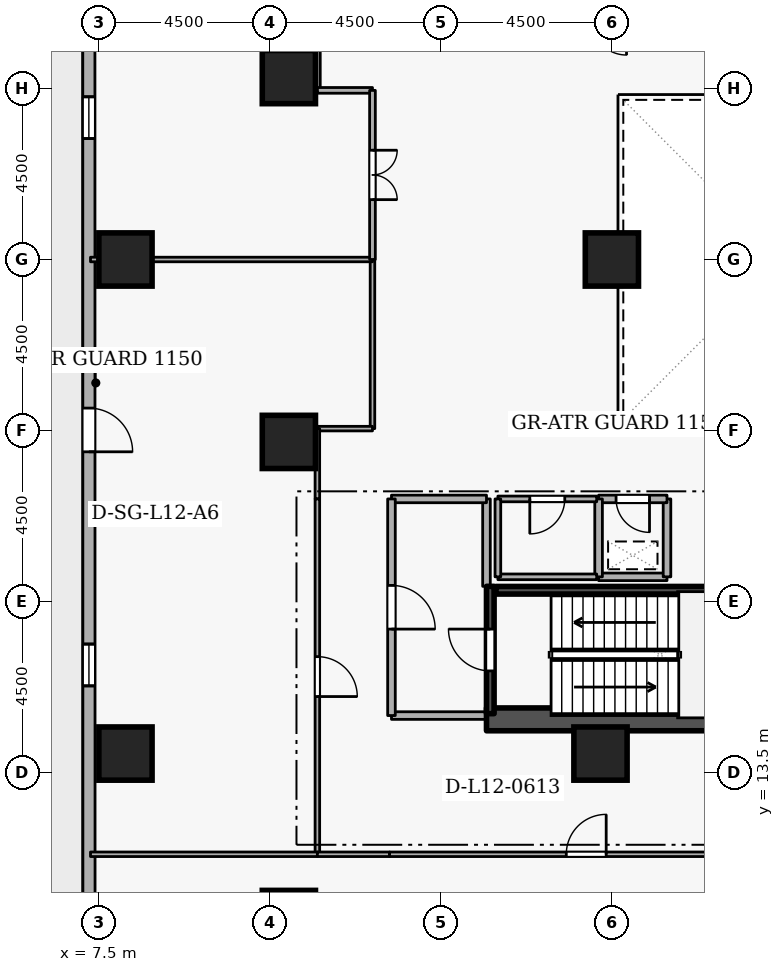
"""IFC4 building model, lengths in metres.
Left out: names, types, materials, properties, quantities, classifications, styles, units other than length and angle.
Written with IfcOpenShell. Run it as: python <this file> out.ifc"""

import sys

from ifc_helpers import new_model, si_unit, direction, frame, frame_2d, origin, origin_2d, place, context, subcontext, project, spatial, rectangle, extrude, element, fill, save


model = new_model("IFC4")
c1 = context("Model", 3, precision=1e-05, world=origin(), true_north=direction((0.0, 1.0)))
c2 = subcontext(c1, "Body", "Model", "MODEL_VIEW")
j1 = project(units=[si_unit("LENGTHUNIT", "METRE"), si_unit("PLANEANGLEUNIT", "RADIAN")], contexts=[c1])
p1 = place(None, origin())
s1 = spatial("IfcSite", under=j1, at=p1, CompositionType="ELEMENT")
p2 = place(p1, origin())
s2 = spatial("IfcBuilding", under=s1, at=p2, CompositionType="ELEMENT")
p3 = place(p2, frame((0.0, 0.0, 49.5)))
s3 = spatial("IfcBuildingStorey", under=s2, at=p3, CompositionType="ELEMENT", Elevation=49.5)
p4 = place(p3, frame((17.7, 14.9, 0.0), z_axis=(0.0, 0.0, 1.0), x_axis=(1.0, 0.0, 0.0)))
e1 = element("IfcWall", 1, at=p4, inside=s3, PredefinedType="SHEAR", context=c2, shape_type="SweptSolid", body=[
    extrude(rectangle(XDim=15.6, YDim=0.6, at=frame_2d((7.8, 0.0))), origin(), (0.0, 0.0, 1.0), 4.2),
])
for number, where, z_axis, x_axis in (
    (2, (12.5, 9.7, 0.0), (0.0, 0.0, 1.0), (1.0, 0.0, 0.0)),
    (3, (8.2, 14.0, 0.0), (0.0, 0.0, 1.0), (1.0, 0.0, 0.0)),
    (4, (8.2, 27.0, 0.0), (0.0, 0.0, 1.0), (1.0, 0.0, 0.0)),
    (5, (12.5, 22.2, 0.0), (0.0, 0.0, 1.0), (1.0, 0.0, 0.0)),
    (6, (12.5, 31.8, 0.0), (0.0, 0.0, 1.0), (1.0, 0.0, 0.0)),
    (7, (20.7, 14.0, 0.0), (0.0, 0.0, 1.0), (1.0, 0.0, 0.0)),
    (8, (21.0, 27.0, 0.0), (0.0, 0.0, 1.0), (1.0, 0.0, 0.0)),
):
    element("IfcColumn", number, at=place(p3, frame(where, z_axis=z_axis, x_axis=x_axis)), inside=s3, PredefinedType="COLUMN", context=c2, shape_type="SweptSolid", body=[
        extrude(rectangle(XDim=1.4, YDim=1.4, at=origin_2d()), origin(), (0.0, 0.0, 1.0), 4.2),
    ])
p5 = place(p3, frame((7.235, 42.681, 0.0), z_axis=(0.0, 0.0, 1.0), x_axis=(0.000150313265, -0.999999988703, 0.0)))
e9 = element("IfcWall", 9, at=p5, inside=s3, PredefinedType="STANDARD", context=c2, shape_type="SweptSolid", body=[
    extrude(rectangle(XDim=35.733, YDim=0.32, at=frame_2d((17.866, 0.0))), origin(), (0.0, 0.0, 1.0), 3.3),
])
p6 = place(p5, frame((19.591, 0.0, 0.0)))
e10 = element("IfcOpeningElement", 10, at=p6, cuts=e9, PredefinedType="OPENING", context=c2, shape_type="SweptSolid", body=[
    extrude(rectangle(XDim=1.15, YDim=2.1, at=frame_2d((0.575, 1.05))), frame((0.0, 0.17, 0.0), z_axis=(0.0, -1.0, 0.0), x_axis=(1.0, 0.0, 0.0)), (0.0, 0.0, 1.0), 0.34),
])
p7 = place(p5, frame((6.6, 0.0, 0.72)))
e11 = element("IfcOpeningElement", 11, at=p7, cuts=e9, PredefinedType="OPENING", context=c2, shape_type="SweptSolid", body=[
    extrude(rectangle(XDim=1.1, YDim=1.8, at=frame_2d((0.55, 0.9))), frame((0.0, 0.17, 0.0), z_axis=(0.0, -1.0, 0.0), x_axis=(1.0, 0.0, 0.0)), (0.0, 0.0, 1.0), 0.34),
])
p8 = place(p5, frame((11.4, 0.0, 0.72)))
e12 = element("IfcOpeningElement", 12, at=p8, cuts=e9, PredefinedType="OPENING", context=c2, shape_type="SweptSolid", body=[
    extrude(rectangle(XDim=1.1, YDim=1.8, at=frame_2d((0.55, 0.9))), frame((0.0, 0.17, 0.0), z_axis=(0.0, -1.0, 0.0), x_axis=(1.0, 0.0, 0.0)), (0.0, 0.0, 1.0), 0.34),
])
p9 = place(p5, frame((25.8, 0.0, 0.72)))
e13 = element("IfcOpeningElement", 13, at=p9, cuts=e9, PredefinedType="OPENING", context=c2, shape_type="SweptSolid", body=[
    extrude(rectangle(XDim=1.1, YDim=1.8, at=frame_2d((0.55, 0.9))), frame((0.0, 0.17, 0.0), z_axis=(0.0, -1.0, 0.0), x_axis=(1.0, 0.0, 0.0)), (0.0, 0.0, 1.0), 0.34),
])
p10 = place(p3, frame((17.8, 15.05, 0.0), z_axis=(0.0, 0.0, 1.0), x_axis=(0.0, 1.0, 0.0)))
e14 = element("IfcWall", 14, at=p10, inside=s3, PredefinedType="SHEAR", context=c2, shape_type="SweptSolid", body=[
    extrude(rectangle(XDim=3.35, YDim=0.2, at=frame_2d((1.675, 0.0))), origin(), (0.0, 0.0, 1.0), 4.2),
])
p11 = place(p10, frame((1.125, 0.0, 0.0)))
e15 = element("IfcOpeningElement", 15, at=p11, cuts=e14, PredefinedType="OPENING", context=c2, shape_type="SweptSolid", body=[
    extrude(rectangle(XDim=1.1, YDim=2.1, at=frame_2d((0.55, 1.05))), frame((0.0, 0.11, 0.0), z_axis=(0.0, -1.0, 0.0), x_axis=(1.0, 0.0, 0.0)), (0.0, 0.0, 1.0), 0.22),
])
p12 = place(p3, frame((25.05, 18.297, 0.0), z_axis=(0.0, 0.0, 1.0), x_axis=(-1.0, 0.0, 0.0)))
e16 = element("IfcWall", 16, at=p12, inside=s3, PredefinedType="SHEAR", context=c2, shape_type="SweptSolid", body=[
    extrude(rectangle(XDim=7.1, YDim=0.2, at=frame_2d((3.55, 0.0))), origin(), (0.0, 0.0, 1.0), 4.2),
])
p13 = place(p3, frame((15.2, 15.0, 0.0), z_axis=(0.0, 0.0, 1.0), x_axis=(1.0, 0.0, 0.0)))
e17 = element("IfcWall", 17, at=p13, inside=s3, PredefinedType="STANDARD", context=c2, shape_type="SweptSolid", body=[
    extrude(rectangle(XDim=2.5, YDim=0.2, at=frame_2d((1.25, 0.0))), origin(), (0.0, 0.0, 1.0), 3.94),
])
p14 = place(p3, frame((17.7, 18.4, 0.0), z_axis=(0.0, 0.0, 1.0), x_axis=(0.0, 1.0, 0.0)))
e18 = element("IfcWall", 18, at=p14, inside=s3, PredefinedType="STANDARD", context=c2, shape_type="SweptSolid", body=[
    extrude(rectangle(XDim=2.3, YDim=0.2, at=frame_2d((1.15, 0.0))), origin(), (0.0, 0.0, 1.0), 3.145),
])
p15 = place(p3, frame((17.7, 20.7, 0.0), z_axis=(0.0, 0.0, 1.0), x_axis=(-1.0, 0.0, 0.0)))
e19 = element("IfcWall", 19, at=p15, inside=s3, PredefinedType="STANDARD", context=c2, shape_type="SweptSolid", body=[
    extrude(rectangle(XDim=2.5, YDim=0.2, at=frame_2d((1.25, 0.0))), origin(), (0.0, 0.0, 1.0), 3.94),
])
p16 = place(p3, frame((15.2, 20.7, 0.0), z_axis=(0.0, 0.0, 1.0), x_axis=(0.0, -1.0, 0.0)))
e20 = element("IfcWall", 20, at=p16, inside=s3, PredefinedType="STANDARD", context=c2, shape_type="SweptSolid", body=[
    extrude(rectangle(XDim=5.7, YDim=0.2, at=frame_2d((2.85, 0.0))), origin(), (0.0, 0.0, 1.0), 3.94),
])
p17 = place(p16, frame((2.275, 0.0, 0.0)))
e21 = element("IfcOpeningElement", 21, at=p17, cuts=e20, PredefinedType="OPENING", context=c2, shape_type="SweptSolid", body=[
    extrude(rectangle(XDim=1.15, YDim=2.1, at=frame_2d((0.575, 1.05))), frame((0.0, 0.11, 0.0), z_axis=(0.0, -1.0, 0.0), x_axis=(1.0, 0.0, 0.0)), (0.0, 0.0, 1.0), 0.22),
])
p18 = place(p3, frame((20.65, 18.65, 0.0), z_axis=(0.0, 0.0, 1.0), x_axis=(1.0, 0.0, 0.0)))
e22 = element("IfcWall", 22, at=p18, inside=s3, PredefinedType="STANDARD", context=c2, shape_type="SweptSolid", body=[
    extrude(rectangle(XDim=1.8, YDim=0.2, at=frame_2d((0.9, 0.0))), origin(), (0.0, 0.0, 1.0), 3.94),
])
p19 = place(p3, frame((22.45, 18.65, 0.0), z_axis=(0.0, 0.0, 1.0), x_axis=(0.0, 1.0, 0.0)))
e23 = element("IfcWall", 23, at=p19, inside=s3, PredefinedType="STANDARD", context=c2, shape_type="SweptSolid", body=[
    extrude(rectangle(XDim=2.05, YDim=0.2, at=frame_2d((1.025, 0.0))), origin(), (0.0, 0.0, 1.0), 3.94),
])
p20 = place(p3, frame((22.45, 20.7, 0.0), z_axis=(0.0, 0.0, 1.0), x_axis=(-1.0, 0.0, 0.0)))
e24 = element("IfcWall", 24, at=p20, inside=s3, PredefinedType="STANDARD", context=c2, shape_type="SweptSolid", body=[
    extrude(rectangle(XDim=1.8, YDim=0.2, at=frame_2d((0.9, 0.0))), origin(), (0.0, 0.0, 1.0), 3.94),
])
p21 = place(p20, frame((0.46, 0.0, 0.0)))
e25 = element("IfcOpeningElement", 25, at=p21, cuts=e24, PredefinedType="OPENING", context=c2, shape_type="SweptSolid", body=[
    extrude(rectangle(XDim=0.88, YDim=2.04, at=frame_2d((0.44, 1.02))), frame((0.0, 0.11, 0.0), z_axis=(0.0, -1.0, 0.0), x_axis=(1.0, 0.0, 0.0)), (0.0, 0.0, 1.0), 0.22),
])
p22 = place(p3, frame((20.65, 20.7, 0.0), z_axis=(0.0, 0.0, 1.0), x_axis=(0.0, -1.0, 0.0)))
e26 = element("IfcWall", 26, at=p22, inside=s3, PredefinedType="STANDARD", context=c2, shape_type="SweptSolid", body=[
    extrude(rectangle(XDim=2.05, YDim=0.2, at=frame_2d((1.025, 0.0))), origin(), (0.0, 0.0, 1.0), 3.94),
])
p23 = place(p3, frame((18.0, 18.65, 0.0), z_axis=(0.0, 0.0, 1.0), x_axis=(1.0, 0.0, 0.0)))
e27 = element("IfcWall", 27, at=p23, inside=s3, PredefinedType="PARTITIONING", context=c2, shape_type="SweptSolid", body=[
    extrude(rectangle(XDim=2.6, YDim=0.15, at=frame_2d((1.3, 0.0))), origin(), (0.0, 0.0, 1.0), 3.94),
])
p24 = place(p3, frame((20.6, 20.7, 0.0), z_axis=(0.0, 0.0, 1.0), x_axis=(-1.0, 0.0, 0.0)))
e28 = element("IfcWall", 28, at=p24, inside=s3, PredefinedType="PARTITIONING", context=c2, shape_type="SweptSolid", body=[
    extrude(rectangle(XDim=2.6, YDim=0.15, at=frame_2d((1.3, 0.0))), origin(), (0.0, 0.0, 1.0), 3.94),
])
p25 = place(p24, frame((0.84, 0.0, 0.0)))
e29 = element("IfcOpeningElement", 29, at=p25, cuts=e28, PredefinedType="OPENING", context=c2, shape_type="SweptSolid", body=[
    extrude(rectangle(XDim=0.92, YDim=2.08, at=frame_2d((0.46, 1.04))), frame((0.0, 0.085, 0.0), z_axis=(0.0, -1.0, 0.0), x_axis=(1.0, 0.0, 0.0)), (0.0, 0.0, 1.0), 0.17),
])
p26 = place(p3, frame((18.0, 20.7, 0.0), z_axis=(0.0, 0.0, 1.0), x_axis=(0.0, -1.0, 0.0)))
e30 = element("IfcWall", 30, at=p26, inside=s3, PredefinedType="PARTITIONING", context=c2, shape_type="SweptSolid", body=[
    extrude(rectangle(XDim=2.05, YDim=0.15, at=frame_2d((1.025, 0.0))), origin(), (0.0, 0.0, 1.0), 3.145),
])
p27 = place(p3, frame((14.7, 27.0, 0.0), z_axis=(0.0, 0.0, 1.0), x_axis=(0.0, -1.0, 0.0)))
e31 = element("IfcWall", 31, at=p27, inside=s3, PredefinedType="PARTITIONING", context=c2, shape_type="SweptSolid", body=[
    extrude(rectangle(XDim=4.45, YDim=0.12, at=frame_2d((2.225, 0.0))), origin(), (0.0, 0.0, 1.0), 3.94),
])
p28 = place(p3, frame((14.7, 22.55, 0.0), z_axis=(0.0, 0.0, 1.0), x_axis=(-1.0, 0.0, 0.0)))
e32 = element("IfcWall", 32, at=p28, inside=s3, PredefinedType="PARTITIONING", context=c2, shape_type="SweptSolid", body=[
    extrude(rectangle(XDim=1.45, YDim=0.12, at=frame_2d((0.725, 0.0))), origin(), (0.0, 0.0, 1.0), 3.94),
])
p29 = place(p3, frame((13.25, 22.55, 0.0), z_axis=(0.0, 0.0, 1.0), x_axis=(0.0, -1.0, 0.0)))
e33 = element("IfcWall", 33, at=p29, inside=s3, PredefinedType="PARTITIONING", context=c2, shape_type="SweptSolid", body=[
    extrude(rectangle(XDim=1.85, YDim=0.12, at=frame_2d((0.925, 0.0))), origin(), (0.0, 0.0, 1.0), 3.94),
])
p30 = place(p3, frame((13.25, 20.7, 0.0), z_axis=(0.0, 0.0, 1.0), x_axis=(0.0, -1.0, 0.0)))
e34 = element("IfcWall", 34, at=p30, inside=s3, PredefinedType="PARTITIONING", context=c2, shape_type="SweptSolid", body=[
    extrude(rectangle(XDim=9.35, YDim=0.12, at=frame_2d((4.675, 0.0))), origin(), (0.0, 0.0, 1.0), 3.94),
])
p31 = place(p30, frame((4.15, 0.0, 0.0)))
e35 = element("IfcOpeningElement", 35, at=p31, cuts=e34, PredefinedType="OPENING", context=c2, shape_type="SweptSolid", body=[
    extrude(rectangle(XDim=1.05, YDim=2.1, at=frame_2d((0.525, 1.05))), frame((0.0, 0.07, 0.0), z_axis=(0.0, -1.0, 0.0), x_axis=(1.0, 0.0, 0.0)), (0.0, 0.0, 1.0), 0.14),
])
p32 = place(p3, frame((13.25, 11.35, 0.0), z_axis=(0.0, 0.0, 1.0), x_axis=(-1.0, 0.0, 0.0)))
e36 = element("IfcWall", 36, at=p32, inside=s3, PredefinedType="PARTITIONING", context=c2, shape_type="SweptSolid", body=[
    extrude(rectangle(XDim=5.97, YDim=0.12, at=frame_2d((2.985, 0.0))), origin(), (0.0, 0.0, 1.0), 3.94),
])
p33 = place(p3, frame((7.28, 27.0, 0.0), z_axis=(0.0, 0.0, 1.0), x_axis=(1.0, 0.0, 0.0)))
e37 = element("IfcWall", 37, at=p33, inside=s3, PredefinedType="PARTITIONING", context=c2, shape_type="SweptSolid", body=[
    extrude(rectangle(XDim=7.42, YDim=0.12, at=frame_2d((3.71, 0.0))), origin(), (0.0, 0.0, 1.0), 3.532),
])
p34 = place(p3, frame((13.25, 33.3, 0.0), z_axis=(0.0, 0.0, 1.0), x_axis=(0.0, -1.0, 0.0)))
e38 = element("IfcWall", 38, at=p34, inside=s3, PredefinedType="PARTITIONING", context=c2, shape_type="SweptSolid", body=[
    extrude(rectangle(XDim=1.85, YDim=0.15, at=frame_2d((0.925, 0.0))), origin(), (0.0, 0.0, 1.0), 3.94),
])
p35 = place(p3, frame((13.25, 31.45, 0.0), z_axis=(0.0, 0.0, 1.0), x_axis=(1.0, 0.0, 0.0)))
e39 = element("IfcWall", 39, at=p35, inside=s3, PredefinedType="PARTITIONING", context=c2, shape_type="SweptSolid", body=[
    extrude(rectangle(XDim=1.45, YDim=0.15, at=frame_2d((0.725, 0.0))), origin(), (0.0, 0.0, 1.0), 3.94),
])
p36 = place(p3, frame((14.7, 31.45, 0.0), z_axis=(0.0, 0.0, 1.0), x_axis=(0.0, -1.0, 0.0)))
e40 = element("IfcWall", 40, at=p36, inside=s3, PredefinedType="PARTITIONING", context=c2, shape_type="SweptSolid", body=[
    extrude(rectangle(XDim=4.45, YDim=0.15, at=frame_2d((2.225, 0.0))), origin(), (0.0, 0.0, 1.0), 3.94),
])
p37 = place(p36, frame((1.575, 0.0, 0.0)))
e41 = element("IfcOpeningElement", 41, at=p37, cuts=e40, PredefinedType="OPENING", context=c2, shape_type="SweptSolid", body=[
    extrude(rectangle(XDim=1.3, YDim=2.12, at=frame_2d((0.65, 1.06))), frame((0.0, 0.085, 0.0), z_axis=(0.0, -1.0, 0.0), x_axis=(1.0, 0.0, 0.0)), (0.0, 0.0, 1.0), 0.17),
])
p38 = place(p3, frame((13.25, 11.35, 0.0), z_axis=(0.0, 0.0, 1.0), x_axis=(1.0, 0.0, 0.0)))
e42 = element("IfcWall", 42, at=p38, inside=s3, PredefinedType="PARTITIONING", context=c2, shape_type="SweptSolid", body=[
    extrude(rectangle(XDim=1.9, YDim=0.12, at=frame_2d((0.95, 0.0))), origin(), (0.0, 0.0, 1.0), 3.94),
])
p39 = place(p3, frame((15.15, 11.35, 0.0), z_axis=(0.0, 0.0, 1.0), x_axis=(1.0, 0.0, 0.0)))
e43 = element("IfcWall", 43, at=p39, inside=s3, PredefinedType="PARTITIONING", context=c2, shape_type="SweptSolid", body=[
    extrude(rectangle(XDim=10.35, YDim=0.12, at=frame_2d((5.175, 0.0))), origin(), (0.0, 0.0, 1.0), 3.94),
])
p40 = place(p39, frame((4.65, 0.0, 0.0)))
e44 = element("IfcOpeningElement", 44, at=p40, cuts=e43, PredefinedType="OPENING", context=c2, shape_type="SweptSolid", body=[
    extrude(rectangle(XDim=1.05, YDim=2.1, at=frame_2d((0.525, 1.05))), frame((0.0, 0.07, 0.0), z_axis=(0.0, -1.0, 0.0), x_axis=(1.0, 0.0, 0.0)), (0.0, 0.0, 1.0), 0.14),
])
p41 = place(p6, origin())
e45 = element("IfcDoor", 45, at=p41, inside=s3, OperationType="SINGLE_SWING_RIGHT", PredefinedType="DOOR", context=c2, shape_type="SweptSolid", body=[
    extrude(rectangle(XDim=1.15, YDim=2.1, at=frame_2d((0.575, 1.05))), frame((0.0, 0.025, 0.0), z_axis=(0.0, -1.0, 0.0), x_axis=(1.0, 0.0, 0.0)), (0.0, 0.0, 1.0), 0.05),
])
fill(e10, e45)
p42 = place(p8, origin())
e46 = element("IfcWindow", 46, at=p42, inside=s3, PartitioningType="SINGLE_PANEL", PredefinedType="WINDOW", context=c2, shape_type="SweptSolid", body=[
    extrude(rectangle(XDim=1.1, YDim=1.8, at=frame_2d((0.55, 0.9))), frame((0.0, 0.03, 0.0), z_axis=(0.0, -1.0, 0.0), x_axis=(1.0, 0.0, 0.0)), (0.0, 0.0, 1.0), 0.06),
])
fill(e12, e46)
p43 = place(p9, origin())
e47 = element("IfcWindow", 47, at=p43, inside=s3, PartitioningType="SINGLE_PANEL", PredefinedType="WINDOW", context=c2, shape_type="SweptSolid", body=[
    extrude(rectangle(XDim=1.1, YDim=1.8, at=frame_2d((0.55, 0.9))), frame((0.0, 0.03, 0.0), z_axis=(0.0, -1.0, 0.0), x_axis=(1.0, 0.0, 0.0)), (0.0, 0.0, 1.0), 0.06),
])
fill(e13, e47)
p44 = place(p11, origin())
e48 = element("IfcDoor", 48, at=p44, inside=s3, OperationType="SINGLE_SWING_RIGHT", PredefinedType="DOOR", context=c2, shape_type="SweptSolid", body=[
    extrude(rectangle(XDim=1.1, YDim=2.1, at=frame_2d((0.55, 1.05))), frame((0.0, 0.025, 0.0), z_axis=(0.0, -1.0, 0.0), x_axis=(1.0, 0.0, 0.0)), (0.0, 0.0, 1.0), 0.05),
])
fill(e15, e48)
p45 = place(p17, origin())
e49 = element("IfcDoor", 49, at=p45, inside=s3, OperationType="SINGLE_SWING_RIGHT", PredefinedType="DOOR", context=c2, shape_type="SweptSolid", body=[
    extrude(rectangle(XDim=1.15, YDim=2.1, at=frame_2d((0.575, 1.05))), frame((0.0, 0.025, 0.0), z_axis=(0.0, -1.0, 0.0), x_axis=(1.0, 0.0, 0.0)), (0.0, 0.0, 1.0), 0.05),
])
fill(e21, e49)
p46 = place(p21, origin())
e50 = element("IfcDoor", 50, at=p46, inside=s3, OperationType="SINGLE_SWING_LEFT", PredefinedType="DOOR", context=c2, shape_type="SweptSolid", body=[
    extrude(rectangle(XDim=0.88, YDim=2.04, at=frame_2d((0.44, 1.02))), frame((0.0, 0.025, 0.0), z_axis=(0.0, -1.0, 0.0), x_axis=(1.0, 0.0, 0.0)), (0.0, 0.0, 1.0), 0.05),
])
fill(e25, e50)
p47 = place(p25, origin())
e51 = element("IfcDoor", 51, at=p47, inside=s3, OperationType="SINGLE_SWING_RIGHT", PredefinedType="DOOR", context=c2, shape_type="SweptSolid", body=[
    extrude(rectangle(XDim=0.92, YDim=2.08, at=frame_2d((0.46, 1.04))), frame((0.0, 0.025, 0.0), z_axis=(0.0, -1.0, 0.0), x_axis=(1.0, 0.0, 0.0)), (0.0, 0.0, 1.0), 0.05),
])
fill(e29, e51)
p48 = place(p31, origin())
e52 = element("IfcDoor", 52, at=p48, inside=s3, OperationType="SINGLE_SWING_RIGHT", PredefinedType="DOOR", context=c2, shape_type="SweptSolid", body=[
    extrude(rectangle(XDim=1.05, YDim=2.1, at=frame_2d((0.525, 1.05))), frame((0.0, 0.025, 0.0), z_axis=(0.0, -1.0, 0.0), x_axis=(1.0, 0.0, 0.0)), (0.0, 0.0, 1.0), 0.05),
])
fill(e35, e52)
p49 = place(p37, origin())
e53 = element("IfcDoor", 53, at=p49, inside=s3, OperationType="DOUBLE_DOOR_SINGLE_SWING", PredefinedType="DOOR", context=c2, shape_type="SweptSolid", body=[
    extrude(rectangle(XDim=1.3, YDim=2.12, at=frame_2d((0.65, 1.06))), frame((0.0, 0.025, 0.0), z_axis=(0.0, -1.0, 0.0), x_axis=(1.0, 0.0, 0.0)), (0.0, 0.0, 1.0), 0.05),
])
fill(e41, e53)
p50 = place(p40, origin())
e54 = element("IfcDoor", 54, at=p50, inside=s3, OperationType="SINGLE_SWING_RIGHT", PredefinedType="DOOR", context=c2, shape_type="SweptSolid", body=[
    extrude(rectangle(XDim=1.05, YDim=2.1, at=frame_2d((0.525, 1.05))), frame((0.0, 0.025, 0.0), z_axis=(0.0, -1.0, 0.0), x_axis=(1.0, 0.0, 0.0)), (0.0, 0.0, 1.0), 0.05),
])
fill(e44, e54)
save(model, sys.argv[1])
